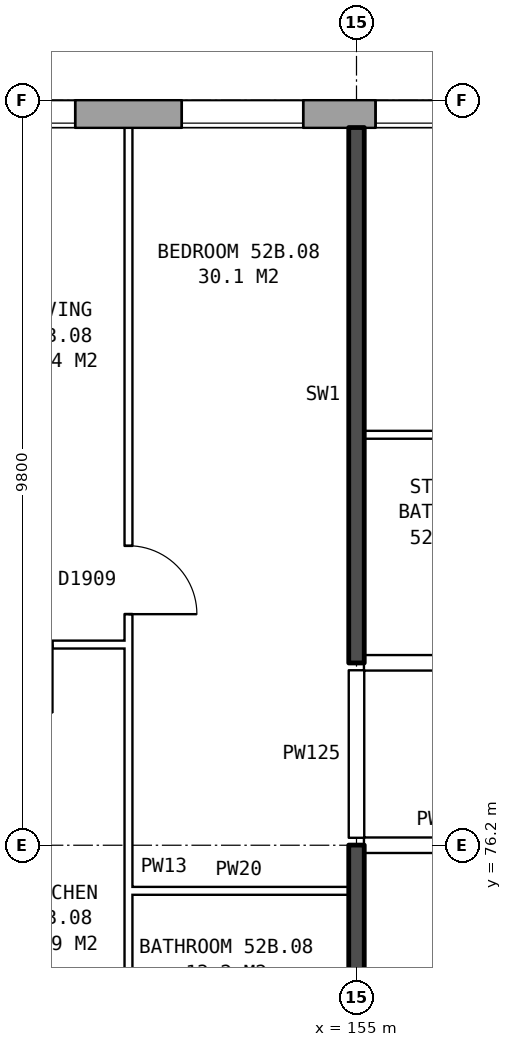
"""IFC4 building model, lengths in metres.
Left out: names, types, materials, properties, quantities, classifications, styles, units other than length and angle.
Written with IfcOpenShell. Run it as: python <this file> out.ifc"""

import sys

from ifc_helpers import new_model, si_unit, direction, frame, frame_2d, origin, place, context, subcontext, project, spatial, rectangle, extrude, element, fill, save


model = new_model("IFC4")
c1 = context("Model", 3, precision=1e-05, world=origin(), true_north=direction((0.0, 1.0)))
c2 = subcontext(c1, "Body", "Model", "MODEL_VIEW")
j1 = project(units=[si_unit("LENGTHUNIT", "METRE"), si_unit("PLANEANGLEUNIT", "RADIAN")], contexts=[c1])
p1 = place(None, origin())
s1 = spatial("IfcSite", under=j1, at=p1, CompositionType="ELEMENT")
p2 = place(p1, origin())
s2 = spatial("IfcBuilding", under=s1, at=p2, CompositionType="ELEMENT")
p3 = place(p2, frame((0.0, 0.0, 185.1)))
s3 = spatial("IfcBuildingStorey", under=s2, at=p3, CompositionType="ELEMENT", Elevation=185.1)
p4 = place(p3, frame((167.175, 85.82, 0.0), z_axis=(0.0, 0.0, 1.0), x_axis=(-1.0, 0.0, 0.0)))
e1 = element("IfcWall", 1, at=p4, inside=s3, PredefinedType="STANDARD", context=c2, shape_type="SweptSolid", body=[
    extrude(rectangle(XDim=33.101, YDim=0.36, at=frame_2d((16.55, 0.0))), origin(), (0.0, 0.0, 1.0), 2.85),
])
p5 = place(p4, frame((0.875, 0.0, 0.8)))
e2 = element("IfcOpeningElement", 2, at=p5, cuts=e1, PredefinedType="OPENING", context=c2, shape_type="SweptSolid", body=[
    extrude(rectangle(XDim=1.6, YDim=1.8, at=frame_2d((0.8, 0.9))), frame((0.0, 0.19, 0.0), z_axis=(0.0, -1.0, 0.0), x_axis=(1.0, 0.0, 0.0)), (0.0, 0.0, 1.0), 0.38),
])
p6 = place(p4, frame((3.875, 0.0, 0.8)))
e3 = element("IfcOpeningElement", 3, at=p6, cuts=e1, PredefinedType="OPENING", context=c2, shape_type="SweptSolid", body=[
    extrude(rectangle(XDim=1.6, YDim=1.8, at=frame_2d((0.8, 0.9))), frame((0.0, 0.19, 0.0), z_axis=(0.0, -1.0, 0.0), x_axis=(1.0, 0.0, 0.0)), (0.0, 0.0, 1.0), 0.38),
])
p7 = place(p4, frame((6.875, 0.0, 0.8)))
e4 = element("IfcOpeningElement", 4, at=p7, cuts=e1, PredefinedType="OPENING", context=c2, shape_type="SweptSolid", body=[
    extrude(rectangle(XDim=1.6, YDim=1.8, at=frame_2d((0.8, 0.9))), frame((0.0, 0.19, 0.0), z_axis=(0.0, -1.0, 0.0), x_axis=(1.0, 0.0, 0.0)), (0.0, 0.0, 1.0), 0.38),
])
p8 = place(p4, frame((8.775, 0.0, 1.4)))
e5 = element("IfcOpeningElement", 5, at=p8, cuts=e1, PredefinedType="OPENING", context=c2, shape_type="SweptSolid", body=[
    extrude(rectangle(XDim=0.8, YDim=1.2, at=frame_2d((0.4, 0.6))), frame((0.0, 0.19, 0.0), z_axis=(0.0, -1.0, 0.0), x_axis=(1.0, 0.0, 0.0)), (0.0, 0.0, 1.0), 0.38),
])
p9 = place(p4, frame((12.875, 0.0, 0.8)))
e6 = element("IfcOpeningElement", 6, at=p9, cuts=e1, PredefinedType="OPENING", context=c2, shape_type="SweptSolid", body=[
    extrude(rectangle(XDim=1.6, YDim=1.8, at=frame_2d((0.8, 0.9))), frame((0.0, 0.19, 0.0), z_axis=(0.0, -1.0, 0.0), x_axis=(1.0, 0.0, 0.0)), (0.0, 0.0, 1.0), 0.38),
])
p10 = place(p4, frame((15.875, 0.0, 0.8)))
e7 = element("IfcOpeningElement", 7, at=p10, cuts=e1, PredefinedType="OPENING", context=c2, shape_type="SweptSolid", body=[
    extrude(rectangle(XDim=1.6, YDim=1.8, at=frame_2d((0.8, 0.9))), frame((0.0, 0.19, 0.0), z_axis=(0.0, -1.0, 0.0), x_axis=(1.0, 0.0, 0.0)), (0.0, 0.0, 1.0), 0.38),
])
p11 = place(p4, frame((18.875, 0.0, 0.8)))
e8 = element("IfcOpeningElement", 8, at=p11, cuts=e1, PredefinedType="OPENING", context=c2, shape_type="SweptSolid", body=[
    extrude(rectangle(XDim=1.6, YDim=1.8, at=frame_2d((0.8, 0.9))), frame((0.0, 0.19, 0.0), z_axis=(0.0, -1.0, 0.0), x_axis=(1.0, 0.0, 0.0)), (0.0, 0.0, 1.0), 0.38),
])
p12 = place(p4, frame((21.325, 0.0, 0.25)))
e9 = element("IfcOpeningElement", 9, at=p12, cuts=e1, PredefinedType="OPENING", context=c2, shape_type="SweptSolid", body=[
    extrude(rectangle(XDim=0.6, YDim=1.8, at=frame_2d((0.3, 0.9))), frame((0.0, 0.19, 0.0), z_axis=(0.0, -1.0, 0.0), x_axis=(1.0, 0.0, 0.0)), (0.0, 0.0, 1.0), 0.38),
])
p13 = place(p4, frame((24.875, 0.0, 0.8)))
e10 = element("IfcOpeningElement", 10, at=p13, cuts=e1, PredefinedType="OPENING", context=c2, shape_type="SweptSolid", body=[
    extrude(rectangle(XDim=1.6, YDim=1.8, at=frame_2d((0.8, 0.9))), frame((0.0, 0.19, 0.0), z_axis=(0.0, -1.0, 0.0), x_axis=(1.0, 0.0, 0.0)), (0.0, 0.0, 1.0), 0.38),
])
p14 = place(p4, frame((27.875, 0.0, 0.8)))
e11 = element("IfcOpeningElement", 11, at=p14, cuts=e1, PredefinedType="OPENING", context=c2, shape_type="SweptSolid", body=[
    extrude(rectangle(XDim=1.6, YDim=1.8, at=frame_2d((0.8, 0.9))), frame((0.0, 0.19, 0.0), z_axis=(0.0, -1.0, 0.0), x_axis=(1.0, 0.0, 0.0)), (0.0, 0.0, 1.0), 0.38),
])
p15 = place(p4, frame((30.875, 0.0, 0.8)))
e12 = element("IfcOpeningElement", 12, at=p15, cuts=e1, PredefinedType="OPENING", context=c2, shape_type="SweptSolid", body=[
    extrude(rectangle(XDim=1.6, YDim=1.8, at=frame_2d((0.8, 0.9))), frame((0.0, 0.19, 0.0), z_axis=(0.0, -1.0, 0.0), x_axis=(1.0, 0.0, 0.0)), (0.0, 0.0, 1.0), 0.38),
])
p16 = place(p4, frame((11.125, 0.0, 0.8)))
e13 = element("IfcOpeningElement", 13, at=p16, cuts=e1, PredefinedType="OPENING", context=c2, shape_type="SweptSolid", body=[
    extrude(rectangle(XDim=0.8, YDim=1.2, at=frame_2d((0.4, 0.6))), frame((0.0, 0.19, 0.0), z_axis=(0.0, -1.0, 0.0), x_axis=(1.0, 0.0, 0.0)), (0.0, 0.0, 1.0), 0.38),
])
p17 = place(p4, frame((22.225, 0.0, 0.15)))
e14 = element("IfcOpeningElement", 14, at=p17, cuts=e1, PredefinedType="OPENING", context=c2, shape_type="SweptSolid", body=[
    extrude(rectangle(XDim=0.6, YDim=0.9, at=frame_2d((0.3, 0.45))), frame((0.0, 0.19, 0.0), z_axis=(0.0, -1.0, 0.0), x_axis=(1.0, 0.0, 0.0)), (0.0, 0.0, 1.0), 0.38),
])
p18 = place(p4, frame((23.325, 0.0, 1.65)))
e15 = element("IfcOpeningElement", 15, at=p18, cuts=e1, PredefinedType="OPENING", context=c2, shape_type="SweptSolid", body=[
    extrude(rectangle(XDim=0.6, YDim=0.9, at=frame_2d((0.3, 0.45))), frame((0.0, 0.19, 0.0), z_axis=(0.0, -1.0, 0.0), x_axis=(1.0, 0.0, 0.0)), (0.0, 0.0, 1.0), 0.38),
])
p19 = place(p3, frame((152.0, 75.6, 0.0), z_axis=(0.0, 0.0, 1.0), x_axis=(1.0, 0.0, 0.0)))
e16 = element("IfcWall", 16, at=p19, inside=s3, PredefinedType="PARTITIONING", context=c2, shape_type="SweptSolid", body=[
    extrude(rectangle(XDim=2.9, YDim=0.1, at=frame_2d((1.45, 0.0))), origin(), (0.0, 0.0, 1.0), 2.85),
])
p20 = place(p3, frame((155.1, 76.2, 0.0), z_axis=(0.0, 0.0, 1.0), x_axis=(1.0, 0.0, 0.0)))
e17 = element("IfcWall", 17, at=p20, inside=s3, PredefinedType="PARTITIONING", context=c2, shape_type="SweptSolid", body=[
    extrude(rectangle(XDim=2.14, YDim=0.2, at=frame_2d((1.07, 0.0))), origin(), (0.0, 0.0, 1.0), 2.85),
])
p21 = place(p3, frame((155.1, 78.6, 0.0), z_axis=(0.0, 0.0, 1.0), x_axis=(1.0, 0.0, 0.0)))
e18 = element("IfcWall", 18, at=p21, inside=s3, PredefinedType="PARTITIONING", context=c2, shape_type="SweptSolid", body=[
    extrude(rectangle(XDim=14.79, YDim=0.2, at=frame_2d((7.395, 0.0))), origin(), (0.0, 0.0, 1.0), 2.85),
])
p22 = place(p21, frame((3.6, 0.0, 0.0)))
e19 = element("IfcOpeningElement", 19, at=p22, cuts=e18, PredefinedType="OPENING", context=c2, shape_type="SweptSolid", body=[
    extrude(rectangle(XDim=1.0, YDim=2.1, at=frame_2d((0.5, 1.05))), frame((0.0, 0.11, 0.0), z_axis=(0.0, -1.0, 0.0), x_axis=(1.0, 0.0, 0.0)), (0.0, 0.0, 1.0), 0.22),
])
p23 = place(p21, frame((7.2, 0.0, 0.0)))
e20 = element("IfcOpeningElement", 20, at=p23, cuts=e18, PredefinedType="OPENING", context=c2, shape_type="SweptSolid", body=[
    extrude(rectangle(XDim=1.0, YDim=2.1, at=frame_2d((0.5, 1.05))), frame((0.0, 0.11, 0.0), z_axis=(0.0, -1.0, 0.0), x_axis=(1.0, 0.0, 0.0)), (0.0, 0.0, 1.0), 0.22),
])
p24 = place(p3, frame((149.1, 78.84, 0.0), z_axis=(0.0, 0.0, 1.0), x_axis=(1.0, 0.0, 0.0)))
e21 = element("IfcWall", 21, at=p24, inside=s3, PredefinedType="PARTITIONING", context=c2, shape_type="SweptSolid", body=[
    extrude(rectangle(XDim=2.9, YDim=0.1, at=frame_2d((1.45, 0.0))), origin(), (0.0, 0.0, 1.0), 2.85),
])
p25 = place(p24, frame((1.0, 0.0, 0.0)))
e22 = element("IfcOpeningElement", 22, at=p25, cuts=e21, PredefinedType="OPENING", context=c2, shape_type="SweptSolid", body=[
    extrude(rectangle(XDim=0.9, YDim=2.1, at=frame_2d((0.45, 1.05))), frame((0.0, 0.06, 0.0), z_axis=(0.0, -1.0, 0.0), x_axis=(1.0, 0.0, 0.0)), (0.0, 0.0, 1.0), 0.12),
])
p26 = place(p3, frame((155.1, 81.6, 0.0), z_axis=(0.0, 0.0, 1.0), x_axis=(1.0, 0.0, 0.0)))
e23 = element("IfcWall", 23, at=p26, inside=s3, PredefinedType="PARTITIONING", context=c2, shape_type="SweptSolid", body=[
    extrude(rectangle(XDim=2.3, YDim=0.1, at=frame_2d((1.15, 0.0))), origin(), (0.0, 0.0, 1.0), 2.85),
])
p27 = place(p3, frame((152.0, 71.3, 0.0), z_axis=(0.0, 0.0, 1.0), x_axis=(0.0, 1.0, 0.0)))
e24 = element("IfcWall", 24, at=p27, inside=s3, PredefinedType="PARTITIONING", context=c2, shape_type="SweptSolid", body=[
    extrude(rectangle(XDim=14.34, YDim=0.1, at=frame_2d((7.17, 0.0))), origin(), (0.0, 0.0, 1.0), 2.85),
])
p28 = place(p27, frame((7.94, 0.0, 0.0)))
e25 = element("IfcOpeningElement", 25, at=p28, cuts=e24, PredefinedType="OPENING", context=c2, shape_type="SweptSolid", body=[
    extrude(rectangle(XDim=0.9, YDim=2.1, at=frame_2d((0.45, 1.05))), frame((0.0, 0.06, 0.0), z_axis=(0.0, -1.0, 0.0), x_axis=(1.0, 0.0, 0.0)), (0.0, 0.0, 1.0), 0.12),
])
p29 = place(p27, frame((0.4, 0.0, 0.0)))
e26 = element("IfcOpeningElement", 26, at=p29, cuts=e24, PredefinedType="OPENING", context=c2, shape_type="SweptSolid", body=[
    extrude(rectangle(XDim=0.9, YDim=2.1, at=frame_2d((0.45, 1.05))), frame((0.0, 0.06, 0.0), z_axis=(0.0, -1.0, 0.0), x_axis=(1.0, 0.0, 0.0)), (0.0, 0.0, 1.0), 0.12),
])
p30 = place(p3, frame((155.0, 71.2, 0.0), z_axis=(0.0, 0.0, 1.0), x_axis=(0.0, 1.0, 0.0)))
e27 = element("IfcWall", 27, at=p30, inside=s3, PredefinedType="SOLIDWALL", context=c2, shape_type="SweptSolid", body=[
    extrude(rectangle(XDim=5.0, YDim=0.2, at=frame_2d((2.5, 0.0))), origin(), (0.0, 0.0, 1.0), 2.85),
])
p31 = place(p3, frame((155.0, 76.3, 0.0), z_axis=(0.0, 0.0, 1.0), x_axis=(0.0, 1.0, 0.0)))
e28 = element("IfcWall", 28, at=p31, inside=s3, PredefinedType="PARTITIONING", context=c2, shape_type="SweptSolid", body=[
    extrude(rectangle(XDim=2.2, YDim=0.2, at=frame_2d((1.1, 0.0))), origin(), (0.0, 0.0, 1.0), 2.85),
])
p32 = place(p3, frame((155.0, 78.6, 0.0), z_axis=(0.0, 0.0, 1.0), x_axis=(0.0, 1.0, 0.0)))
e29 = element("IfcWall", 29, at=p32, inside=s3, PredefinedType="SOLIDWALL", context=c2, shape_type="SweptSolid", body=[
    extrude(rectangle(XDim=7.04, YDim=0.2, at=frame_2d((3.52, 0.0))), origin(), (0.0, 0.0, 1.0), 2.85),
])
p33 = place(p9, origin())
e30 = element("IfcWindow", 30, at=p33, inside=s3, PartitioningType="SINGLE_PANEL", PredefinedType="WINDOW", context=c2, shape_type="SweptSolid", body=[
    extrude(rectangle(XDim=1.6, YDim=1.8, at=frame_2d((0.8, 0.9))), frame((0.0, 0.15, 0.0), z_axis=(0.0, -1.0, 0.0), x_axis=(1.0, 0.0, 0.0)), (0.0, 0.0, 1.0), 0.06),
])
fill(e6, e30)
p34 = place(p10, origin())
e31 = element("IfcWindow", 31, at=p34, inside=s3, PartitioningType="SINGLE_PANEL", PredefinedType="WINDOW", context=c2, shape_type="SweptSolid", body=[
    extrude(rectangle(XDim=1.6, YDim=1.8, at=frame_2d((0.8, 0.9))), frame((0.0, 0.15, 0.0), z_axis=(0.0, -1.0, 0.0), x_axis=(1.0, 0.0, 0.0)), (0.0, 0.0, 1.0), 0.06),
])
fill(e7, e31)
p35 = place(p28, frame((0.9, 0.0, 0.0), z_axis=(0.0, 0.0, 1.0), x_axis=(-1.0, 0.0, 0.0)))
e32 = element("IfcDoor", 32, at=p35, inside=s3, OperationType="SINGLE_SWING_RIGHT", PredefinedType="DOOR", context=c2, shape_type="SweptSolid", body=[
    extrude(rectangle(XDim=0.9, YDim=2.1, at=frame_2d((0.45, 1.05))), frame((0.0, 0.025, 0.0), z_axis=(0.0, -1.0, 0.0), x_axis=(1.0, 0.0, 0.0)), (0.0, 0.0, 1.0), 0.05),
])
fill(e25, e32)
p36 = place(p16, origin())
e33 = element("IfcWindow", 33, at=p36, inside=s3, PartitioningType="SINGLE_PANEL", PredefinedType="WINDOW", context=c2, shape_type="SweptSolid", body=[
    extrude(rectangle(XDim=0.8, YDim=1.2, at=frame_2d((0.4, 0.6))), frame((0.0, 0.15, 0.0), z_axis=(0.0, -1.0, 0.0), x_axis=(1.0, 0.0, 0.0)), (0.0, 0.0, 1.0), 0.06),
])
fill(e13, e33)
save(model, sys.argv[1])
